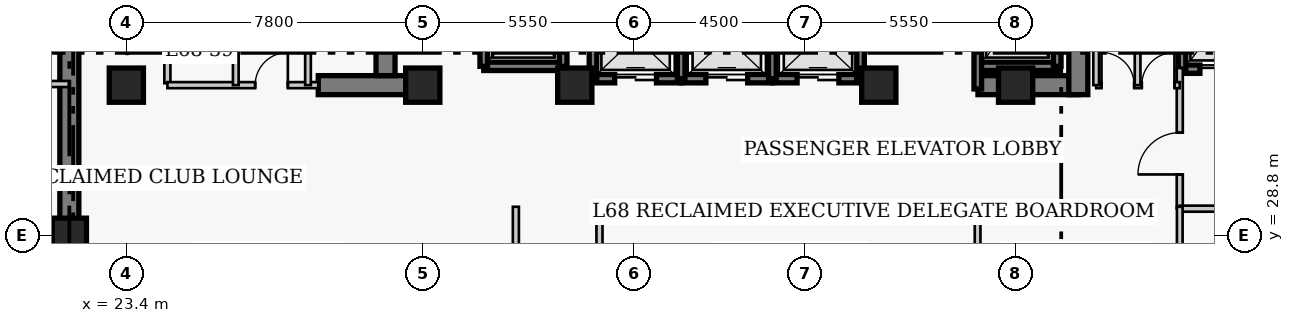
"""IFC4 building model, lengths in metres.
Left out: names, types, materials, properties, quantities, classifications, styles, units other than length and angle.
Written with IfcOpenShell. Run it as: python <this file> out.ifc"""

import sys

from ifc_helpers import new_model, si_unit, direction, frame, frame_2d, origin, origin_2d, place, context, subcontext, project, spatial, rectangle, extrude, element, fill, save


model = new_model("IFC4")
c1 = context("Model", 3, precision=1e-05, world=origin(), true_north=direction((0.0, 1.0)))
c2 = subcontext(c1, "Body", "Model", "MODEL_VIEW")
j1 = project(units=[si_unit("LENGTHUNIT", "METRE"), si_unit("PLANEANGLEUNIT", "RADIAN")], contexts=[c1])
p1 = place(None, origin())
s1 = spatial("IfcSite", under=j1, at=p1, CompositionType="ELEMENT")
p2 = place(p1, origin())
s2 = spatial("IfcBuilding", under=s1, at=p2, CompositionType="ELEMENT")
p3 = place(p2, frame((0.0, 0.0, 273.4)))
s3 = spatial("IfcBuildingStorey", under=s2, at=p3, CompositionType="ELEMENT", Elevation=273.4)
p4 = place(p3, frame((21.9, 27.05, 0.0), z_axis=(0.0, 0.0, 1.0), x_axis=(0.0, 1.0, 0.0)))
e1 = element("IfcWall", 1, at=p4, inside=s3, PredefinedType="SHEAR", context=c2, shape_type="SweptSolid", body=[
    extrude(rectangle(XDim=13.52, YDim=0.5, at=frame_2d((6.76, 0.0))), origin(), (0.0, 0.0, 1.0), 4.0),
])
p5 = place(p3, frame((28.45, 32.75, 0.0), z_axis=(0.0, 0.0, 1.0), x_axis=(1.0, 0.0, 0.0)))
e2 = element("IfcWall", 2, at=p5, inside=s3, PredefinedType="SHEAR", context=c2, shape_type="SweptSolid", body=[
    extrude(rectangle(XDim=2.4, YDim=0.5, at=frame_2d((1.2, 0.0))), origin(), (0.0, 0.0, 1.0), 4.0),
])
p6 = place(p3, frame((45.81, 32.75, 0.0), z_axis=(0.0, 0.0, 1.0), x_axis=(1.0, 0.0, 0.0)))
e3 = element("IfcWall", 3, at=p6, inside=s3, PredefinedType="SHEAR", context=c2, shape_type="SweptSolid", body=[
    extrude(rectangle(XDim=2.64, YDim=0.5, at=frame_2d((1.32, 0.0))), origin(), (0.0, 0.0, 1.0), 4.0),
])
p7 = place(p3, frame((30.22, 33.0, 0.0), z_axis=(0.0, 0.0, 1.0), x_axis=(0.0, 1.0, 0.0)))
e4 = element("IfcWall", 4, at=p7, inside=s3, PredefinedType="SHEAR", context=c2, shape_type="SweptSolid", body=[
    extrude(rectangle(XDim=7.32, YDim=0.5, at=frame_2d((3.66, 0.0))), origin(), (0.0, 0.0, 1.0), 4.0),
])
p8 = place(p3, frame((48.45, 32.5, 0.0), z_axis=(0.0, 0.0, 1.0), x_axis=(0.0, 1.0, 0.0)))
e5 = element("IfcWall", 5, at=p8, inside=s3, PredefinedType="SHEAR", context=c2, shape_type="SweptSolid", body=[
    extrude(rectangle(XDim=7.82, YDim=0.5, at=frame_2d((3.91, 0.0))), origin(), (0.0, 0.0, 1.0), 4.0),
])
p9 = place(p8, frame((5.7, 0.0, 0.0)))
e6 = element("IfcOpeningElement", 6, at=p9, cuts=e5, PredefinedType="OPENING", context=c2, shape_type="SweptSolid", body=[
    extrude(rectangle(XDim=1.1, YDim=2.15, at=frame_2d((0.55, 1.075))), frame((0.0, 0.26, 0.0), z_axis=(0.0, -1.0, 0.0), x_axis=(1.0, 0.0, 0.0)), (0.0, 0.0, 1.0), 0.52),
])
for number, where, z_axis, x_axis in (
    (7, (21.9, 28.8, 0.0), (0.0, 0.0, 1.0), (1.0, 0.0, 0.0)),
    (8, (23.4, 32.75, 0.0), (0.0, 0.0, 1.0), (1.0, 0.0, 0.0)),
    (9, (31.2, 32.75, 0.0), (0.0, 0.0, 1.0), (1.0, 0.0, 0.0)),
    (10, (35.2, 32.75, 0.0), (0.0, 0.0, 1.0), (1.0, 0.0, 0.0)),
    (11, (43.2, 32.75, 0.0), (0.0, 0.0, 1.0), (1.0, 0.0, 0.0)),
    (12, (46.8, 32.75, 0.0), (0.0, 0.0, 1.0), (1.0, 0.0, 0.0)),
):
    element("IfcColumn", number, at=place(p3, frame(where, z_axis=z_axis, x_axis=x_axis)), inside=s3, PredefinedType="COLUMN", context=c2, shape_type="SweptSolid", body=[
        extrude(rectangle(XDim=0.9, YDim=0.9, at=origin_2d()), origin(), (0.0, 0.0, 1.0), 4.0),
    ])
p10 = place(p3, frame((35.68, 32.92, 0.0), z_axis=(0.0, 0.0, 1.0), x_axis=(1.0, 0.0, 0.0)))
e13 = element("IfcWall", 13, at=p10, inside=s3, PredefinedType="SHEAR", context=c2, shape_type="SweptSolid", body=[
    extrude(rectangle(XDim=2.32, YDim=0.22, at=frame_2d((1.16, 0.0))), origin(), (0.0, 0.0, 1.0), 4.0),
])
p11 = place(p10, frame((0.57, 0.0, 0.0)))
e14 = element("IfcOpeningElement", 14, at=p11, cuts=e13, PredefinedType="OPENING", context=c2, shape_type="SweptSolid", body=[
    extrude(rectangle(XDim=1.1, YDim=2.15, at=frame_2d((0.55, 1.075))), frame((0.0, 0.12, 0.0), z_axis=(0.0, -1.0, 0.0), x_axis=(1.0, 0.0, 0.0)), (0.0, 0.0, 1.0), 0.24),
])
p12 = place(p3, frame((35.68, 32.92, 0.0), z_axis=(0.0, 0.0, 1.0), x_axis=(0.0, 1.0, 0.0)))
e15 = element("IfcWall", 15, at=p12, inside=s3, PredefinedType="SHEAR", context=c2, shape_type="SweptSolid", body=[
    extrude(rectangle(XDim=2.16, YDim=0.2, at=frame_2d((1.08, 0.0))), origin(), (0.0, 0.0, 1.0), 4.0),
])
p13 = place(p3, frame((38.0, 32.92, 0.0), z_axis=(0.0, 0.0, 1.0), x_axis=(1.0, 0.0, 0.0)))
e16 = element("IfcWall", 16, at=p13, inside=s3, PredefinedType="SHEAR", context=c2, shape_type="SweptSolid", body=[
    extrude(rectangle(XDim=2.4, YDim=0.22, at=frame_2d((1.2, 0.0))), origin(), (0.0, 0.0, 1.0), 4.0),
])
p14 = place(p13, frame((0.65, 0.0, 0.0)))
e17 = element("IfcOpeningElement", 17, at=p14, cuts=e16, PredefinedType="OPENING", context=c2, shape_type="SweptSolid", body=[
    extrude(rectangle(XDim=1.1, YDim=2.15, at=frame_2d((0.55, 1.075))), frame((0.0, 0.12, 0.0), z_axis=(0.0, -1.0, 0.0), x_axis=(1.0, 0.0, 0.0)), (0.0, 0.0, 1.0), 0.24),
])
p15 = place(p3, frame((38.0, 32.92, 0.0), z_axis=(0.0, 0.0, 1.0), x_axis=(0.0, 1.0, 0.0)))
e18 = element("IfcWall", 18, at=p15, inside=s3, PredefinedType="SHEAR", context=c2, shape_type="SweptSolid", body=[
    extrude(rectangle(XDim=2.16, YDim=0.2, at=frame_2d((1.08, 0.0))), origin(), (0.0, 0.0, 1.0), 4.0),
])
p16 = place(p3, frame((40.4, 32.92, 0.0), z_axis=(0.0, 0.0, 1.0), x_axis=(1.0, 0.0, 0.0)))
e19 = element("IfcWall", 19, at=p16, inside=s3, PredefinedType="SHEAR", context=c2, shape_type="SweptSolid", body=[
    extrude(rectangle(XDim=2.32, YDim=0.22, at=frame_2d((1.16, 0.0))), origin(), (0.0, 0.0, 1.0), 4.0),
])
p17 = place(p16, frame((0.65, 0.0, 0.0)))
e20 = element("IfcOpeningElement", 20, at=p17, cuts=e19, PredefinedType="OPENING", context=c2, shape_type="SweptSolid", body=[
    extrude(rectangle(XDim=1.1, YDim=2.15, at=frame_2d((0.55, 1.075))), frame((0.0, 0.12, 0.0), z_axis=(0.0, -1.0, 0.0), x_axis=(1.0, 0.0, 0.0)), (0.0, 0.0, 1.0), 0.24),
])
for number, where, z_axis, x_axis in (
    (21, (40.4, 32.92, 0.0), (0.0, 0.0, 1.0), (0.0, 1.0, 0.0)),
    (22, (42.72, 32.92, 0.0), (0.0, 0.0, 1.0), (0.0, 1.0, 0.0)),
):
    element("IfcWall", number, at=place(p3, frame(where, z_axis=z_axis, x_axis=x_axis)), inside=s3, PredefinedType="SHEAR", context=c2, shape_type="SweptSolid", body=[
        extrude(rectangle(XDim=2.16, YDim=0.2, at=frame_2d((1.08, 0.0))), origin(), (0.0, 0.0, 1.0), 4.0),
    ])
p18 = place(p3, frame((51.18, 33.17, 0.0), z_axis=(0.0, 0.0, 1.0), x_axis=(1.0, 0.0, 0.0)))
e23 = element("IfcWall", 23, at=p18, inside=s3, PredefinedType="SHEAR", context=c2, shape_type="SweptSolid", body=[
    extrude(rectangle(XDim=2.42, YDim=0.22, at=frame_2d((1.21, 0.0))), origin(), (0.0, 0.0, 1.0), 4.0),
])
p19 = place(p18, frame((0.47, 0.0, 0.0)))
e24 = element("IfcOpeningElement", 24, at=p19, cuts=e23, PredefinedType="OPENING", context=c2, shape_type="SweptSolid", body=[
    extrude(rectangle(XDim=1.3, YDim=2.15, at=frame_2d((0.65, 1.075))), frame((0.0, 0.12, 0.0), z_axis=(0.0, -1.0, 0.0), x_axis=(1.0, 0.0, 0.0)), (0.0, 0.0, 1.0), 0.24),
])
p20 = place(p3, frame((51.18, 33.17, 0.0), z_axis=(0.0, 0.0, 1.0), x_axis=(0.0, 1.0, 0.0)))
e25 = element("IfcWall", 25, at=p20, inside=s3, PredefinedType="SHEAR", context=c2, shape_type="SweptSolid", body=[
    extrude(rectangle(XDim=2.86, YDim=0.2, at=frame_2d((1.43, 0.0))), origin(), (0.0, 0.0, 1.0), 4.0),
])
p21 = place(p3, frame((32.805, 33.245, 0.0), z_axis=(0.0, 0.0, 1.0), x_axis=(1.0, 0.0, 0.0)))
e26 = element("IfcWall", 26, at=p21, inside=s3, PredefinedType="SHEAR", context=c2, shape_type="SweptSolid", body=[
    extrude(rectangle(XDim=2.09, YDim=0.22, at=frame_2d((1.045, 0.0))), origin(), (0.0, 0.0, 1.0), 4.0),
])
for number, where, z_axis, x_axis in (
    (27, (32.805, 33.245, 0.0), (0.0, 0.0, 1.0), (0.0, 1.0, 0.0)),
    (28, (34.895, 33.245, 0.0), (0.0, 0.0, 1.0), (0.0, 1.0, 0.0)),
):
    element("IfcWall", number, at=place(p3, frame(where, z_axis=z_axis, x_axis=x_axis)), inside=s3, PredefinedType="SHEAR", context=c2, shape_type="SweptSolid", body=[
        extrude(rectangle(XDim=2.91, YDim=0.2, at=frame_2d((1.455, 0.0))), origin(), (0.0, 0.0, 1.0), 4.0),
    ])
p22 = place(p3, frame((45.805, 33.245, 0.0), z_axis=(0.0, 0.0, 1.0), x_axis=(1.0, 0.0, 0.0)))
e29 = element("IfcWall", 29, at=p22, inside=s3, PredefinedType="SHEAR", context=c2, shape_type="SweptSolid", body=[
    extrude(rectangle(XDim=2.09, YDim=0.22, at=frame_2d((1.045, 0.0))), origin(), (0.0, 0.0, 1.0), 4.0),
])
p23 = place(p3, frame((45.805, 32.65, 0.0), z_axis=(0.0, 0.0, 1.0), x_axis=(0.0, 1.0, 0.0)))
e30 = element("IfcWall", 30, at=p23, inside=s3, PredefinedType="SHEAR", context=c2, shape_type="SweptSolid", body=[
    extrude(rectangle(XDim=3.505, YDim=0.2, at=frame_2d((1.752, 0.0))), origin(), (0.0, 0.0, 1.0), 4.0),
])
p24 = place(p3, frame((47.895, 33.245, 0.0), z_axis=(0.0, 0.0, 1.0), x_axis=(0.0, 1.0, 0.0)))
e31 = element("IfcWall", 31, at=p24, inside=s3, PredefinedType="SHEAR", context=c2, shape_type="SweptSolid", body=[
    extrude(rectangle(XDim=2.91, YDim=0.2, at=frame_2d((1.455, 0.0))), origin(), (0.0, 0.0, 1.0), 4.0),
])
p25 = place(p3, frame((24.48, 32.8, 0.0), z_axis=(0.0, 0.0, 1.0), x_axis=(0.0, 1.0, 0.0)))
e32 = element("IfcWall", 32, at=p25, inside=s3, PredefinedType="PARTITIONING", context=c2, shape_type="SweptSolid", body=[
    extrude(rectangle(XDim=3.57, YDim=0.16, at=frame_2d((1.785, 0.0))), origin(), (0.0, 0.0, 1.0), 3.76),
])
p26 = place(p25, frame((1.604, 0.0, 0.0)))
e33 = element("IfcOpeningElement", 33, at=p26, cuts=e32, PredefinedType="OPENING", context=c2, shape_type="SweptSolid", body=[
    extrude(rectangle(XDim=0.9, YDim=2.1, at=frame_2d((0.45, 1.05))), frame((0.0, 0.09, 0.0), z_axis=(0.0, -1.0, 0.0), x_axis=(1.0, 0.0, 0.0)), (0.0, 0.0, 1.0), 0.18),
])
p27 = place(p3, frame((51.12, 29.5, 0.0), z_axis=(0.0, 0.0, 1.0), x_axis=(0.0, 1.0, 0.0)))
e34 = element("IfcWall", 34, at=p27, inside=s3, PredefinedType="PARTITIONING", context=c2, shape_type="SweptSolid", body=[
    extrude(rectangle(XDim=3.7, YDim=0.16, at=frame_2d((1.85, 0.0))), origin(), (0.0, 0.0, 1.0), 3.76),
])
p28 = place(p27, frame((0.9, 0.0, 0.0)))
e35 = element("IfcOpeningElement", 35, at=p28, cuts=e34, PredefinedType="OPENING", context=c2, shape_type="SweptSolid", body=[
    extrude(rectangle(XDim=1.1, YDim=2.15, at=frame_2d((0.55, 1.075))), frame((0.0, 0.09, 0.0), z_axis=(0.0, -1.0, 0.0), x_axis=(1.0, 0.0, 0.0)), (0.0, 0.0, 1.0), 0.18),
])
p29 = place(p3, frame((51.12, 29.5, 0.0), z_axis=(0.0, 0.0, 1.0), x_axis=(1.0, 0.0, 0.0)))
e36 = element("IfcWall", 36, at=p29, inside=s3, PredefinedType="PARTITIONING", context=c2, shape_type="SweptSolid", body=[
    extrude(rectangle(XDim=5.63, YDim=0.16, at=frame_2d((2.815, 0.0))), origin(), (0.0, 0.0, 1.0), 3.76),
])
p30 = place(p3, frame((24.48, 32.75, 0.0), z_axis=(0.0, 0.0, 1.0), x_axis=(1.0, 0.0, 0.0)))
e37 = element("IfcWall", 37, at=p30, inside=s3, PredefinedType="PARTITIONING", context=c2, shape_type="SweptSolid", body=[
    extrude(rectangle(XDim=3.97, YDim=0.16, at=frame_2d((1.985, 0.0))), origin(), (0.0, 0.0, 1.0), 3.76),
])
p31 = place(p30, frame((2.31, 0.0, 0.0)))
e38 = element("IfcOpeningElement", 38, at=p31, cuts=e37, PredefinedType="OPENING", context=c2, shape_type="SweptSolid", body=[
    extrude(rectangle(XDim=0.86, YDim=2.05, at=frame_2d((0.43, 1.025))), frame((0.0, 0.09, 0.0), z_axis=(0.0, -1.0, 0.0), x_axis=(1.0, 0.0, 0.0)), (0.0, 0.0, 1.0), 0.18),
])
p32 = place(p3, frame((48.92, 32.75, 0.0), z_axis=(0.0, 0.0, 1.0), x_axis=(1.0, 0.0, 0.0)))
e39 = element("IfcWall", 39, at=p32, inside=s3, PredefinedType="PARTITIONING", context=c2, shape_type="SweptSolid", body=[
    extrude(rectangle(XDim=2.2, YDim=0.16, at=frame_2d((1.1, 0.0))), origin(), (0.0, 0.0, 1.0), 3.76),
])
p33 = place(p32, frame((0.14, 0.0, 0.0)))
e40 = element("IfcOpeningElement", 40, at=p33, cuts=e39, PredefinedType="OPENING", context=c2, shape_type="SweptSolid", body=[
    extrude(rectangle(XDim=0.86, YDim=2.05, at=frame_2d((0.43, 1.025))), frame((0.0, 0.09, 0.0), z_axis=(0.0, -1.0, 0.0), x_axis=(1.0, 0.0, 0.0)), (0.0, 0.0, 1.0), 0.18),
])
p34 = place(p32, frame((1.2, 0.0, 0.0)))
e41 = element("IfcOpeningElement", 41, at=p34, cuts=e39, PredefinedType="OPENING", context=c2, shape_type="SweptSolid", body=[
    extrude(rectangle(XDim=0.86, YDim=2.05, at=frame_2d((0.43, 1.025))), frame((0.0, 0.09, 0.0), z_axis=(0.0, -1.0, 0.0), x_axis=(1.0, 0.0, 0.0)), (0.0, 0.0, 1.0), 0.18),
])
for number, where, z_axis, x_axis in (
    (42, (48.92, 32.75, 0.0), (0.0, 0.0, 1.0), (0.0, 1.0, 0.0)),
    (43, (26.28, 32.75, 0.0), (0.0, 0.0, 1.0), (0.0, 1.0, 0.0)),
    (44, (28.18, 32.75, 0.0), (0.0, 0.0, 1.0), (0.0, 1.0, 0.0)),
    (45, (50.01, 32.75, 0.0), (0.0, 0.0, 1.0), (0.0, 1.0, 0.0)),
):
    element("IfcWall", number, at=place(p3, frame(where, z_axis=z_axis, x_axis=x_axis)), inside=s3, PredefinedType="PARTITIONING", context=c2, shape_type="SweptSolid", body=[
        extrude(rectangle(XDim=3.62, YDim=0.15, at=frame_2d((1.81, 0.0))), origin(), (0.0, 0.0, 1.0), 3.76),
    ])
for number, where, z_axis, x_axis in (
    (46, (33.65, 26.41, 0.0), (0.0, 0.0, 1.0), (0.0, 1.0, 0.0)),
    (47, (35.85, 26.41, 0.0), (0.0, 0.0, 1.0), (0.0, 1.0, 0.0)),
):
    element("IfcWall", number, at=place(p3, frame(where, z_axis=z_axis, x_axis=x_axis)), inside=s3, PredefinedType="PARTITIONING", context=c2, shape_type="SweptSolid", body=[
        extrude(rectangle(XDim=3.14, YDim=0.16, at=frame_2d((1.57, 0.0))), origin(), (0.0, 0.0, 1.0), 3.76),
    ])
p35 = place(p3, frame((20.46, 32.78, 0.0), z_axis=(0.0, 0.0, 1.0), x_axis=(1.0, 0.0, 0.0)))
e48 = element("IfcWall", 48, at=p35, inside=s3, PredefinedType="PARTITIONING", context=c2, shape_type="SweptSolid", body=[
    extrude(rectangle(XDim=1.44, YDim=0.16, at=frame_2d((0.72, 0.0))), origin(), (0.0, 0.0, 1.0), 3.76),
])
for number, where, z_axis, x_axis in (
    (49, (45.8, 26.41, 0.0), (0.0, 0.0, 1.0), (0.0, 1.0, 0.0)),
    (50, (51.12, 26.41, 0.0), (0.0, 0.0, 1.0), (0.0, 1.0, 0.0)),
):
    element("IfcWall", number, at=place(p3, frame(where, z_axis=z_axis, x_axis=x_axis)), inside=s3, PredefinedType="PARTITIONING", context=c2, shape_type="SweptSolid", body=[
        extrude(rectangle(XDim=3.14, YDim=0.15, at=frame_2d((1.57, 0.0))), origin(), (0.0, 0.0, 1.0), 3.76),
    ])
p36 = place(p11, origin())
e51 = element("IfcDoor", 51, at=p36, inside=s3, OperationType="DOUBLE_DOOR_SLIDING", PredefinedType="DOOR", context=c2, shape_type="SweptSolid", body=[
    extrude(rectangle(XDim=1.1, YDim=2.15, at=frame_2d((0.55, 1.075))), frame((0.0, 0.025, 0.0), z_axis=(0.0, -1.0, 0.0), x_axis=(1.0, 0.0, 0.0)), (0.0, 0.0, 1.0), 0.05),
])
fill(e14, e51)
p37 = place(p14, origin())
e52 = element("IfcDoor", 52, at=p37, inside=s3, OperationType="DOUBLE_DOOR_SLIDING", PredefinedType="DOOR", context=c2, shape_type="SweptSolid", body=[
    extrude(rectangle(XDim=1.1, YDim=2.15, at=frame_2d((0.55, 1.075))), frame((0.0, 0.025, 0.0), z_axis=(0.0, -1.0, 0.0), x_axis=(1.0, 0.0, 0.0)), (0.0, 0.0, 1.0), 0.05),
])
fill(e17, e52)
p38 = place(p17, origin())
e53 = element("IfcDoor", 53, at=p38, inside=s3, OperationType="DOUBLE_DOOR_SLIDING", PredefinedType="DOOR", context=c2, shape_type="SweptSolid", body=[
    extrude(rectangle(XDim=1.1, YDim=2.15, at=frame_2d((0.55, 1.075))), frame((0.0, 0.025, 0.0), z_axis=(0.0, -1.0, 0.0), x_axis=(1.0, 0.0, 0.0)), (0.0, 0.0, 1.0), 0.05),
])
fill(e20, e53)
p39 = place(p19, origin())
e54 = element("IfcDoor", 54, at=p39, inside=s3, OperationType="DOUBLE_DOOR_SLIDING", PredefinedType="DOOR", context=c2, shape_type="SweptSolid", body=[
    extrude(rectangle(XDim=1.3, YDim=2.15, at=frame_2d((0.65, 1.075))), frame((0.0, 0.025, 0.0), z_axis=(0.0, -1.0, 0.0), x_axis=(1.0, 0.0, 0.0)), (0.0, 0.0, 1.0), 0.05),
])
fill(e24, e54)
p40 = place(p28, origin())
e55 = element("IfcDoor", 55, at=p40, inside=s3, OperationType="SINGLE_SWING_LEFT", PredefinedType="DOOR", context=c2, shape_type="SweptSolid", body=[
    extrude(rectangle(XDim=1.1, YDim=2.15, at=frame_2d((0.55, 1.075))), frame((0.0, 0.025, 0.0), z_axis=(0.0, -1.0, 0.0), x_axis=(1.0, 0.0, 0.0)), (0.0, 0.0, 1.0), 0.05),
])
fill(e35, e55)
p41 = place(p31, origin())
e56 = element("IfcDoor", 56, at=p41, inside=s3, OperationType="SINGLE_SWING_RIGHT", PredefinedType="DOOR", context=c2, shape_type="SweptSolid", body=[
    extrude(rectangle(XDim=0.86, YDim=2.05, at=frame_2d((0.43, 1.025))), frame((0.0, 0.025, 0.0), z_axis=(0.0, -1.0, 0.0), x_axis=(1.0, 0.0, 0.0)), (0.0, 0.0, 1.0), 0.05),
])
fill(e38, e56)
p42 = place(p33, origin())
e57 = element("IfcDoor", 57, at=p42, inside=s3, OperationType="SINGLE_SWING_LEFT", PredefinedType="DOOR", context=c2, shape_type="SweptSolid", body=[
    extrude(rectangle(XDim=0.86, YDim=2.05, at=frame_2d((0.43, 1.025))), frame((0.0, 0.025, 0.0), z_axis=(0.0, -1.0, 0.0), x_axis=(1.0, 0.0, 0.0)), (0.0, 0.0, 1.0), 0.05),
])
fill(e40, e57)
p43 = place(p34, origin())
e58 = element("IfcDoor", 58, at=p43, inside=s3, OperationType="SINGLE_SWING_RIGHT", PredefinedType="DOOR", context=c2, shape_type="SweptSolid", body=[
    extrude(rectangle(XDim=0.86, YDim=2.05, at=frame_2d((0.43, 1.025))), frame((0.0, 0.025, 0.0), z_axis=(0.0, -1.0, 0.0), x_axis=(1.0, 0.0, 0.0)), (0.0, 0.0, 1.0), 0.05),
])
fill(e41, e58)
save(model, sys.argv[1])
